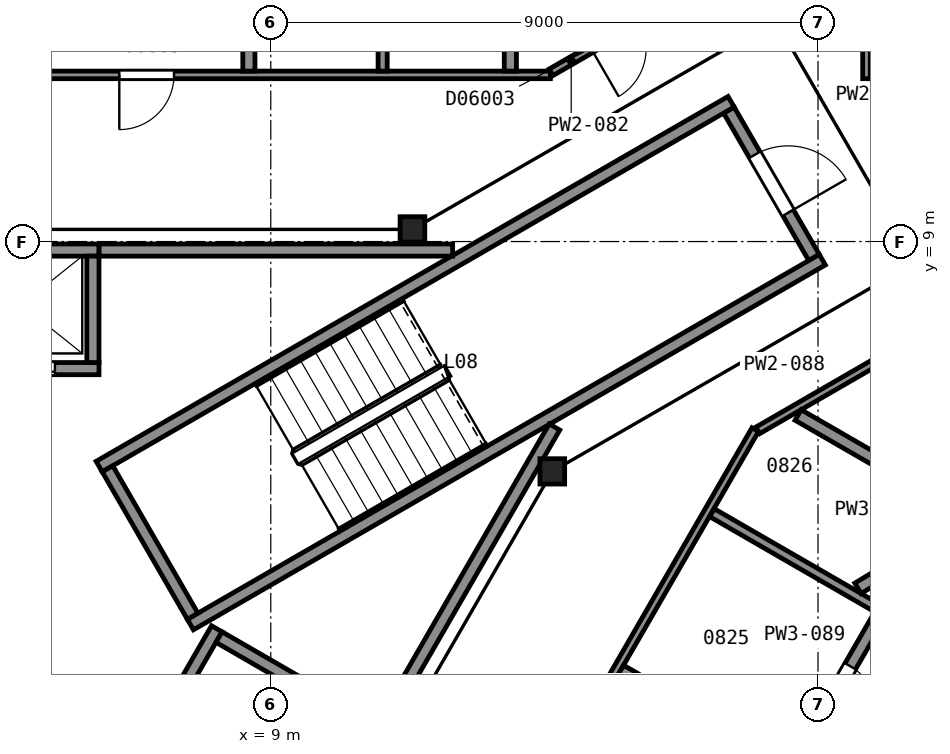
"""IFC4 building model, lengths in metres.
Left out: names, types, materials, properties, quantities, classifications, styles, units other than length and angle.
Written with IfcOpenShell. Run it as: python <this file> out.ifc"""

import sys

from ifc_helpers import new_model, si_unit, direction, frame, frame_2d, origin, origin_2d, place, context, subcontext, project, spatial, rectangle, i_section, extrude, element, fill, save


model = new_model("IFC4")
c1 = context("Model", 3, precision=1e-05, world=origin(), true_north=direction((0.0, 1.0)))
c2 = subcontext(c1, "Body", "Model", "MODEL_VIEW")
j1 = project(units=[si_unit("LENGTHUNIT", "METRE"), si_unit("PLANEANGLEUNIT", "RADIAN")], contexts=[c1])
p1 = place(None, origin())
s1 = spatial("IfcSite", under=j1, at=p1, CompositionType="ELEMENT")
p2 = place(p1, origin())
s2 = spatial("IfcBuilding", under=s1, at=p2, CompositionType="ELEMENT")
p3 = place(p2, frame((0.0, 0.0, 44.0)))
s3 = spatial("IfcBuildingStorey", under=s2, at=p3, CompositionType="ELEMENT", Elevation=44.0)
for number, where, z_axis, x_axis in (
    (1, (13.63, 5.22, 0.0), (0.0, 0.0, 1.0), (1.0, 0.0, 0.0)),
    (2, (11.33, 9.2, 0.0), (0.0, 0.0, 1.0), (1.0, 0.0, 0.0)),
):
    element("IfcColumn", number, at=place(p3, frame(where, z_axis=z_axis, x_axis=x_axis)), inside=s3, PredefinedType="COLUMN", context=c2, shape_type="SweptSolid", body=[
        extrude(i_section(OverallWidth=0.406, OverallDepth=0.417, WebThickness=0.03, FlangeThickness=0.048, FilletRadius=0.015, at=origin_2d()), origin(), (0.0, 0.0, 1.0), 3.6),
    ])
p4 = place(p3, frame((17.934, 8.738, 0.0), z_axis=(0.0, 0.0, 1.0), x_axis=(-0.49998411664, 0.866034573852, 0.0)))
e3 = element("IfcWall", 3, at=p4, inside=s3, PredefinedType="PARTITIONING", context=c2, shape_type="SweptSolid", body=[
    extrude(rectangle(XDim=2.8, YDim=0.2, at=frame_2d((1.4, 0.0))), origin(), (0.0, 0.0, 1.0), 3.35),
])
p5 = place(p4, frame((0.85, 0.0, 0.0)))
e4 = element("IfcOpeningElement", 4, at=p5, cuts=e3, PredefinedType="OPENING", context=c2, shape_type="SweptSolid", body=[
    extrude(rectangle(XDim=1.1, YDim=2.1, at=frame_2d((0.55, 1.05))), frame((0.0, 0.11, 0.0), z_axis=(0.0, -1.0, 0.0), x_axis=(1.0, 0.0, 0.0)), (0.0, 0.0, 1.0), 0.22),
])
for number, where, z_axis, x_axis in (
    (5, (6.178, 5.299, 0.0), (0.0, 0.0, 1.0), (0.866, 0.5, 0.0)),
    (6, (7.678, 2.701, 0.0), (0.0, 0.0, 1.0), (0.866, 0.5, 0.0)),
):
    element("IfcWall", number, at=place(p3, frame(where, z_axis=z_axis, x_axis=x_axis)), inside=s3, PredefinedType="PARTITIONING", context=c2, shape_type="SweptSolid", body=[
        extrude(rectangle(XDim=12.0, YDim=0.2, at=frame_2d((6.0, 0.0))), origin(), (0.0, 0.0, 1.0), 3.35),
    ])
p6 = place(p3, frame((7.715, 2.838, 0.0), z_axis=(0.0, 0.0, 1.0), x_axis=(-0.500049511043, 0.865996816683, 0.0)))
e7 = element("IfcWall", 7, at=p6, inside=s3, PredefinedType="PARTITIONING", context=c2, shape_type="SweptSolid", body=[
    extrude(rectangle(XDim=2.8, YDim=0.2, at=frame_2d((1.4, 0.0))), origin(), (0.0, 0.0, 1.0), 3.35),
])
p7 = place(p3, frame((3.625, 6.91, 0.0), z_axis=(0.0, 0.0, 1.0), x_axis=(1.0, 0.0, 0.0)))
e8 = element("IfcWall", 8, at=p7, inside=s3, PredefinedType="PARTITIONING", context=c2, shape_type="SweptSolid", body=[
    extrude(rectangle(XDim=2.55, YDim=0.2, at=frame_2d((1.275, 0.0))), origin(), (0.0, 0.0, 1.0), 3.6),
])
p8 = place(p7, frame((0.725, 0.0, 0.0)))
e9 = element("IfcOpeningElement", 9, at=p8, cuts=e8, PredefinedType="OPENING", context=c2, shape_type="SweptSolid", body=[
    extrude(rectangle(XDim=1.1, YDim=2.1, at=frame_2d((0.55, 1.05))), frame((0.0, 0.11, 0.0), z_axis=(0.0, -1.0, 0.0), x_axis=(1.0, 0.0, 0.0)), (0.0, 0.0, 1.0), 0.22),
])
p9 = place(p3, frame((3.625, 8.86, 0.0), z_axis=(0.0, 0.0, 1.0), x_axis=(1.0, 0.0, 0.0)))
e10 = element("IfcWall", 10, at=p9, inside=s3, PredefinedType="PARTITIONING", context=c2, shape_type="SweptSolid", body=[
    extrude(rectangle(XDim=2.55, YDim=0.2, at=frame_2d((1.275, 0.0))), origin(), (0.0, 0.0, 1.0), 3.6),
])
p10 = place(p3, frame((5.663, -1.612, 0.0), z_axis=(0.0, 0.0, 1.0), x_axis=(0.49998122708, 0.866036242063, 0.0)))
e11 = element("IfcWall", 11, at=p10, inside=s3, PredefinedType="PARTITIONING", context=c2, shape_type="SweptSolid", body=[
    extrude(rectangle(XDim=4.9, YDim=0.2, at=frame_2d((2.45, 0.0))), origin(), (0.0, 0.0, 1.0), 3.6),
])
p11 = place(p3, frame((6.075, 7.01, 0.0), z_axis=(0.0, 0.0, 1.0), x_axis=(0.0, 1.0, 0.0)))
e12 = element("IfcWall", 12, at=p11, inside=s3, PredefinedType="PARTITIONING", context=c2, shape_type="SweptSolid", body=[
    extrude(rectangle(XDim=1.75, YDim=0.2, at=frame_2d((0.875, 0.0))), origin(), (0.0, 0.0, 1.0), 3.6),
])
p12 = place(p3, frame((9.665, 1.62, 0.0), z_axis=(0.0, 0.0, 1.0), x_axis=(-0.866002029911, 0.500040482552, 0.0)))
e13 = element("IfcWall", 13, at=p12, inside=s3, PredefinedType="PARTITIONING", context=c2, shape_type="SweptSolid", body=[
    extrude(rectangle(XDim=1.75, YDim=0.2, at=frame_2d((0.875, 0.0))), origin(), (0.0, 0.0, 1.0), 3.6),
])
p13 = place(p3, frame((6.177, 8.86, 0.0), z_axis=(0.0, 0.0, 1.0), x_axis=(1.0, 0.0, 0.0)))
e14 = element("IfcWall", 14, at=p13, inside=s3, PredefinedType="PARTITIONING", context=c2, shape_type="SweptSolid", body=[
    extrude(rectangle(XDim=5.814, YDim=0.2, at=frame_2d((2.907, 0.0))), origin(), (0.0, 0.0, 1.0), 3.35),
])
p14 = place(p3, frame((8.492, -3.012, 0.0), z_axis=(0.0, 0.0, 1.0), x_axis=(0.499972957231, 0.866041016371, 0.0)))
e15 = element("IfcWall", 15, at=p14, inside=s3, PredefinedType="PARTITIONING", context=c2, shape_type="SweptSolid", body=[
    extrude(rectangle(XDim=10.349, YDim=0.2, at=frame_2d((5.174, 0.0))), origin(), (0.0, 0.0, 1.0), 3.35),
])
p15 = place(p3, frame((-13.598, 11.741, 0.0), z_axis=(0.0, 0.0, 1.0), x_axis=(1.0, 0.0, 0.0)))
e16 = element("IfcWall", 16, at=p15, inside=s3, PredefinedType="PARTITIONING", context=c2, shape_type="SweptSolid", body=[
    extrude(rectangle(XDim=27.197, YDim=0.125, at=frame_2d((13.598, 0.0))), origin(), (0.0, 0.0, 1.0), 2.613),
])
p16 = place(p15, frame((20.107, 0.0, 0.0)))
e17 = element("IfcOpeningElement", 17, at=p16, cuts=e16, PredefinedType="OPENING", context=c2, shape_type="SweptSolid", body=[
    extrude(rectangle(XDim=0.9, YDim=2.1, at=frame_2d((0.45, 1.05))), frame((0.0, 0.073, 0.0), z_axis=(0.0, -1.0, 0.0), x_axis=(1.0, 0.0, 0.0)), (0.0, 0.0, 1.0), 0.145),
])
p17 = place(p15, frame((16.97, 0.0, 0.0)))
e18 = element("IfcOpeningElement", 18, at=p17, cuts=e16, PredefinedType="OPENING", context=c2, shape_type="SweptSolid", body=[
    extrude(rectangle(XDim=0.9, YDim=2.1, at=frame_2d((0.45, 1.05))), frame((0.0, 0.073, 0.0), z_axis=(0.0, -1.0, 0.0), x_axis=(1.0, 0.0, 0.0)), (0.0, 0.0, 1.0), 0.145),
])
p18 = place(p15, frame((9.934, 0.0, 0.0)))
e19 = element("IfcOpeningElement", 19, at=p18, cuts=e16, PredefinedType="OPENING", context=c2, shape_type="SweptSolid", body=[
    extrude(rectangle(XDim=0.9, YDim=2.1, at=frame_2d((0.45, 1.05))), frame((0.0, 0.073, 0.0), z_axis=(0.0, -1.0, 0.0), x_axis=(1.0, 0.0, 0.0)), (0.0, 0.0, 1.0), 0.145),
])
p19 = place(p15, frame((6.858, 0.0, 0.0)))
e20 = element("IfcOpeningElement", 20, at=p19, cuts=e16, PredefinedType="OPENING", context=c2, shape_type="SweptSolid", body=[
    extrude(rectangle(XDim=1.0, YDim=2.1, at=frame_2d((0.5, 1.05))), frame((0.0, 0.073, 0.0), z_axis=(0.0, -1.0, 0.0), x_axis=(1.0, 0.0, 0.0)), (0.0, 0.0, 1.0), 0.145),
])
p20 = place(p3, frame((16.967, 5.906, 0.0), z_axis=(0.0, 0.0, 1.0), x_axis=(-0.500024758804, -0.866011108811, 0.0)))
e21 = element("IfcWall", 21, at=p20, inside=s3, PredefinedType="PARTITIONING", context=c2, shape_type="SweptSolid", body=[
    extrude(rectangle(XDim=26.402, YDim=0.125, at=frame_2d((13.201, 0.0))), origin(), (0.0, 0.0, 1.0), 2.613),
])
p21 = place(p20, frame((24.689, 0.0, 0.0)))
e22 = element("IfcOpeningElement", 22, at=p21, cuts=e21, PredefinedType="OPENING", context=c2, shape_type="SweptSolid", body=[
    extrude(rectangle(XDim=0.9, YDim=2.1, at=frame_2d((0.45, 1.05))), frame((0.0, 0.073, 0.0), z_axis=(0.0, -1.0, 0.0), x_axis=(1.0, 0.0, 0.0)), (0.0, 0.0, 1.0), 0.145),
])
p22 = place(p20, frame((17.709, 0.0, 0.0)))
e23 = element("IfcOpeningElement", 23, at=p22, cuts=e21, PredefinedType="OPENING", context=c2, shape_type="SweptSolid", body=[
    extrude(rectangle(XDim=0.9, YDim=2.1, at=frame_2d((0.45, 1.05))), frame((0.0, 0.073, 0.0), z_axis=(0.0, -1.0, 0.0), x_axis=(1.0, 0.0, 0.0)), (0.0, 0.0, 1.0), 0.145),
])
p23 = place(p20, frame((14.928, 0.0, 0.0)))
e24 = element("IfcOpeningElement", 24, at=p23, cuts=e21, PredefinedType="OPENING", context=c2, shape_type="SweptSolid", body=[
    extrude(rectangle(XDim=0.9, YDim=2.1, at=frame_2d((0.45, 1.05))), frame((0.0, 0.073, 0.0), z_axis=(0.0, -1.0, 0.0), x_axis=(1.0, 0.0, 0.0)), (0.0, 0.0, 1.0), 0.145),
])
p24 = place(p20, frame((8.2, 0.0, 0.0)))
e25 = element("IfcOpeningElement", 25, at=p24, cuts=e21, PredefinedType="OPENING", context=c2, shape_type="SweptSolid", body=[
    extrude(rectangle(XDim=0.9, YDim=2.1, at=frame_2d((0.45, 1.05))), frame((0.0, 0.073, 0.0), z_axis=(0.0, -1.0, 0.0), x_axis=(1.0, 0.0, 0.0)), (0.0, 0.0, 1.0), 0.145),
])
p25 = place(p20, frame((5.473, 0.0, 0.0)))
e26 = element("IfcOpeningElement", 26, at=p25, cuts=e21, PredefinedType="OPENING", context=c2, shape_type="SweptSolid", body=[
    extrude(rectangle(XDim=1.0, YDim=2.1, at=frame_2d((0.5, 1.05))), frame((0.0, 0.073, 0.0), z_axis=(0.0, -1.0, 0.0), x_axis=(1.0, 0.0, 0.0)), (0.0, 0.0, 1.0), 0.145),
])
p26 = place(p3, frame((8.64, 11.803, 0.0), z_axis=(0.0, 0.0, 1.0), x_axis=(0.0, 1.0, 0.0)))
e27 = element("IfcWall", 27, at=p26, inside=s3, PredefinedType="PARTITIONING", context=c2, shape_type="SweptSolid", body=[
    extrude(rectangle(XDim=2.838, YDim=0.2, at=frame_2d((1.419, 0.0))), origin(), (0.0, 0.0, 1.0), 2.613),
])
p27 = place(p3, frame((10.84, 11.803, 0.0), z_axis=(0.0, 0.0, 1.0), x_axis=(0.0, 1.0, 0.0)))
e28 = element("IfcWall", 28, at=p27, inside=s3, PredefinedType="PARTITIONING", context=c2, shape_type="SweptSolid", body=[
    extrude(rectangle(XDim=8.592, YDim=0.15, at=frame_2d((4.296, 0.0))), origin(), (0.0, 0.0, 1.0), 2.613),
])
p28 = place(p3, frame((12.94, 11.803, 0.0), z_axis=(0.0, 0.0, 1.0), x_axis=(0.0, 1.0, 0.0)))
e29 = element("IfcWall", 29, at=p28, inside=s3, PredefinedType="PARTITIONING", context=c2, shape_type="SweptSolid", body=[
    extrude(rectangle(XDim=2.812, YDim=0.2, at=frame_2d((1.406, 0.0))), origin(), (0.0, 0.0, 1.0), 2.613),
])
p29 = place(p3, frame((13.61, 11.783, 0.0), z_axis=(0.0, 0.0, 1.0), x_axis=(0.86608938841, 0.499889158998, 0.0)))
e30 = element("IfcWall", 30, at=p29, inside=s3, PredefinedType="PARTITIONING", context=c2, shape_type="SweptSolid", body=[
    extrude(rectangle(XDim=2.409, YDim=0.125, at=frame_2d((1.204, 0.0))), origin(), (0.0, 0.0, 1.0), 2.613),
])
p30 = place(p29, frame((0.765, 0.0, 0.0)))
e31 = element("IfcOpeningElement", 31, at=p30, cuts=e30, PredefinedType="OPENING", context=c2, shape_type="SweptSolid", body=[
    extrude(rectangle(XDim=0.9, YDim=2.1, at=frame_2d((0.45, 1.05))), frame((0.0, 0.073, 0.0), z_axis=(0.0, -1.0, 0.0), x_axis=(1.0, 0.0, 0.0)), (0.0, 0.0, 1.0), 0.145),
])
p31 = place(p3, frame((14.752, 1.945, 0.0), z_axis=(0.0, 0.0, 1.0), x_axis=(0.866033317326, -0.499986293093, 0.0)))
e32 = element("IfcWall", 32, at=p31, inside=s3, PredefinedType="PARTITIONING", context=c2, shape_type="SweptSolid", body=[
    extrude(rectangle(XDim=3.337, YDim=0.2, at=frame_2d((1.669, 0.0))), origin(), (0.0, 0.0, 1.0), 2.613),
])
p32 = place(p3, frame((16.256, 4.54, 0.0), z_axis=(0.0, 0.0, 1.0), x_axis=(0.866031705461, -0.499989085017, 0.0)))
e33 = element("IfcWall", 33, at=p32, inside=s3, PredefinedType="PARTITIONING", context=c2, shape_type="SweptSolid", body=[
    extrude(rectangle(XDim=8.587, YDim=0.15, at=frame_2d((4.293, 0.0))), origin(), (0.0, 0.0, 1.0), 2.613),
])
p33 = place(p3, frame((17.01, 5.895, 0.0), z_axis=(0.0, 0.0, 1.0), x_axis=(0.865944638795, 0.50013986298, 0.0)))
e34 = element("IfcWall", 34, at=p33, inside=s3, PredefinedType="PARTITIONING", context=c2, shape_type="SweptSolid", body=[
    extrude(rectangle(XDim=2.599, YDim=0.125, at=frame_2d((1.299, 0.0))), origin(), (0.0, 0.0, 1.0), 2.613),
])
p34 = place(p3, frame((17.606, 0.413, 0.0), z_axis=(0.0, 0.0, 1.0), x_axis=(0.500024172624, 0.866011447264, 0.0)))
e35 = element("IfcWall", 35, at=p34, inside=s3, PredefinedType="PARTITIONING", context=c2, shape_type="SweptSolid", body=[
    extrude(rectangle(XDim=2.825, YDim=0.2, at=frame_2d((1.413, 0.0))), origin(), (0.0, 0.0, 1.0), 2.613),
])
p35 = place(p34, frame((0.95, 0.0, 0.0)))
e36 = element("IfcOpeningElement", 36, at=p35, cuts=e35, PredefinedType="OPENING", context=c2, shape_type="SweptSolid", body=[
    extrude(rectangle(XDim=0.9, YDim=2.1, at=frame_2d((0.45, 1.05))), frame((0.0, 0.11, 0.0), z_axis=(0.0, -1.0, 0.0), x_axis=(1.0, 0.0, 0.0)), (0.0, 0.0, 1.0), 0.22),
])
p36 = place(p3, frame((17.673, 6.147, 0.0), z_axis=(0.0, 0.0, 1.0), x_axis=(0.866077754448, -0.499909315027, 0.0)))
e37 = element("IfcWall", 37, at=p36, inside=s3, PredefinedType="PARTITIONING", context=c2, shape_type="SweptSolid", body=[
    extrude(rectangle(XDim=3.469, YDim=0.2, at=frame_2d((1.734, 0.0))), origin(), (0.0, 0.0, 1.0), 2.613),
])
p37 = place(p3, frame((18.657, 3.297, 0.0), z_axis=(0.0, 0.0, 1.0), x_axis=(0.856262573572, 0.51654080681, 0.0)))
e38 = element("IfcWall", 38, at=p37, inside=s3, PredefinedType="PARTITIONING", context=c2, shape_type="SweptSolid", body=[
    extrude(rectangle(XDim=2.088, YDim=0.2, at=frame_2d((1.044, 0.0))), origin(), (0.0, 0.0, 1.0), 2.613),
])
p38 = place(p37, frame((0.659, 0.0, 0.0)))
e39 = element("IfcOpeningElement", 39, at=p38, cuts=e38, PredefinedType="OPENING", context=c2, shape_type="SweptSolid", body=[
    extrude(rectangle(XDim=0.8, YDim=2.1, at=frame_2d((0.4, 1.05))), frame((0.0, 0.11, 0.0), z_axis=(0.0, -1.0, 0.0), x_axis=(1.0, 0.0, 0.0)), (0.0, 0.0, 1.0), 0.22),
])
p39 = place(p3, frame((18.797, 11.678, 0.0), z_axis=(0.0, 0.0, 1.0), x_axis=(0.0, 1.0, 0.0)))
e40 = element("IfcWall", 40, at=p39, inside=s3, PredefinedType="PARTITIONING", context=c2, shape_type="SweptSolid", body=[
    extrude(rectangle(XDim=2.394, YDim=0.125, at=frame_2d((1.197, 0.0))), origin(), (0.0, 0.0, 1.0), 2.613),
])
p40 = place(p5, origin())
e41 = element("IfcDoor", 41, at=p40, inside=s3, OperationType="SINGLE_SWING_LEFT", PredefinedType="DOOR", context=c2, shape_type="SweptSolid", body=[
    extrude(rectangle(XDim=1.1, YDim=2.1, at=frame_2d((0.55, 1.05))), frame((0.0, 0.025, 0.0), z_axis=(0.0, -1.0, 0.0), x_axis=(1.0, 0.0, 0.0)), (0.0, 0.0, 1.0), 0.05),
])
fill(e4, e41)
p41 = place(p8, origin())
e42 = element("IfcDoor", 42, at=p41, inside=s3, OperationType="SLIDING_TO_LEFT", PredefinedType="DOOR", context=c2, shape_type="SweptSolid", body=[
    extrude(rectangle(XDim=1.1, YDim=2.1, at=frame_2d((0.55, 1.05))), frame((0.0, 0.025, 0.0), z_axis=(0.0, -1.0, 0.0), x_axis=(1.0, 0.0, 0.0)), (0.0, 0.0, 1.0), 0.05),
])
fill(e9, e42)
p42 = place(p16, origin())
e43 = element("IfcDoor", 43, at=p42, inside=s3, OperationType="SINGLE_SWING_LEFT", PredefinedType="DOOR", context=c2, shape_type="SweptSolid", body=[
    extrude(rectangle(XDim=0.9, YDim=2.1, at=frame_2d((0.45, 1.05))), frame((0.0, 0.025, 0.0), z_axis=(0.0, -1.0, 0.0), x_axis=(1.0, 0.0, 0.0)), (0.0, 0.0, 1.0), 0.05),
])
fill(e17, e43)
p43 = place(p35, origin())
e44 = element("IfcDoor", 44, at=p43, inside=s3, OperationType="SINGLE_SWING_LEFT", PredefinedType="DOOR", context=c2, shape_type="SweptSolid", body=[
    extrude(rectangle(XDim=0.9, YDim=2.1, at=frame_2d((0.45, 1.05))), frame((0.0, 0.025, 0.0), z_axis=(0.0, -1.0, 0.0), x_axis=(1.0, 0.0, 0.0)), (0.0, 0.0, 1.0), 0.05),
])
fill(e36, e44)
save(model, sys.argv[1])
